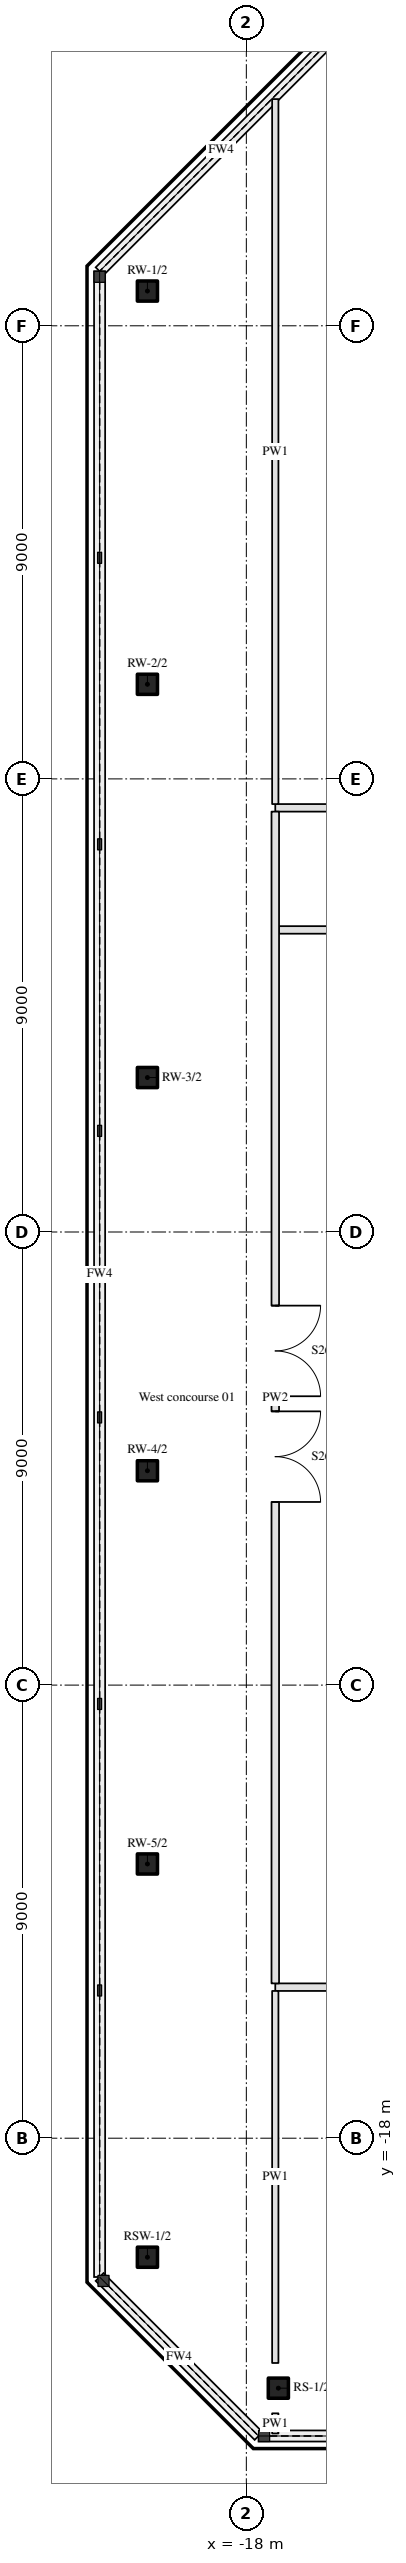
"""IFC4 building model, lengths in metres.
Left out: names, types, materials, properties, quantities, classifications, styles, units other than length and angle.
Written with IfcOpenShell. Run it as: python <this file> out.ifc"""

import sys

from ifc_helpers import new_model, si_unit, direction, frame, frame_2d, origin, origin_2d, place, context, subcontext, project, spatial, rectangle, hollow_rectangle, extrude, element, fill, save


model = new_model("IFC4")
c1 = context("Model", 3, precision=1e-05, world=origin(), true_north=direction((0.0, 1.0)))
c2 = subcontext(c1, "Body", "Model", "MODEL_VIEW")
j1 = project(units=[si_unit("LENGTHUNIT", "METRE"), si_unit("PLANEANGLEUNIT", "RADIAN")], contexts=[c1])
p1 = place(None, origin())
s1 = spatial("IfcSite", under=j1, at=p1, CompositionType="ELEMENT")
p2 = place(p1, origin())
s2 = spatial("IfcBuilding", under=s1, at=p2, CompositionType="ELEMENT")
p3 = place(p2, frame((0.0, 0.0, 108.9)))
s3 = spatial("IfcBuildingStorey", under=s2, at=p3, CompositionType="ELEMENT", Elevation=108.9)
for number, where, z_axis, x_axis in (
    (1, (-17.364, -22.965, 0.0), (0.0, 0.0, 1.0), (1.0, 0.0, 0.0)),
    (2, (-19.965, 18.69, 0.0), (0.0, 0.0, 1.0), (1.0, 0.0, 0.0)),
    (3, (-19.965, 10.879, 0.0), (0.0, 0.0, 1.0), (1.0, 0.0, 0.0)),
    (4, (-19.965, 3.068, 0.0), (0.0, 0.0, 1.0), (1.0, 0.0, 0.0)),
    (5, (-19.965, -4.742, 0.0), (0.0, 0.0, 1.0), (1.0, 0.0, 0.0)),
    (6, (-19.965, -12.553, 0.0), (0.0, 0.0, 1.0), (1.0, 0.0, 0.0)),
    (7, (-19.965, -20.364, 0.0), (0.0, 0.0, 1.0), (1.0, 0.0, 0.0)),
):
    element("IfcColumn", number, at=place(p3, frame(where, z_axis=z_axis, x_axis=x_axis)), inside=s3, PredefinedType="COLUMN", context=c2, shape_type="SweptSolid", body=[
        extrude(hollow_rectangle(XDim=0.4, YDim=0.4, WallThickness=0.025, InnerFilletRadius=0.038, OuterFilletRadius=0.062, at=origin_2d()), origin(), (0.0, 0.0, 1.0), 5.4),
    ])
p4 = place(p3, frame((-17.425, -15.0, 0.0), z_axis=(0.0, 0.0, 1.0), x_axis=(1.0, 0.0, 0.0)))
e8 = element("IfcWall", 8, at=p4, inside=s3, PredefinedType="PARTITIONING", context=c2, shape_type="SweptSolid", body=[
    extrude(rectangle(XDim=34.85, YDim=0.15, at=frame_2d((17.425, 0.0))), origin(), (0.0, 0.0, 1.0), 4.46),
])
p5 = place(p4, frame((16.525, 0.0, 0.0)))
e9 = element("IfcOpeningElement", 9, at=p5, cuts=e8, PredefinedType="OPENING", context=c2, shape_type="SweptSolid", body=[
    extrude(rectangle(XDim=1.8, YDim=2.1, at=frame_2d((0.9, 1.05))), frame((0.0, 0.085, 0.0), z_axis=(0.0, -1.0, 0.0), x_axis=(1.0, 0.0, 0.0)), (0.0, 0.0, 1.0), 0.17),
])
p6 = place(p4, frame((18.625, 0.0, 0.0)))
e10 = element("IfcOpeningElement", 10, at=p6, cuts=e8, PredefinedType="OPENING", context=c2, shape_type="SweptSolid", body=[
    extrude(rectangle(XDim=1.8, YDim=2.1, at=frame_2d((0.9, 1.05))), frame((0.0, 0.085, 0.0), z_axis=(0.0, -1.0, 0.0), x_axis=(1.0, 0.0, 0.0)), (0.0, 0.0, 1.0), 0.17),
])
p7 = place(p3, frame((-17.35, 6.0, 0.0), z_axis=(0.0, 0.0, 1.0), x_axis=(1.0, 0.0, 0.0)))
e11 = element("IfcWall", 11, at=p7, inside=s3, PredefinedType="PARTITIONING", context=c2, shape_type="SweptSolid", body=[
    extrude(rectangle(XDim=10.0, YDim=0.15, at=frame_2d((5.0, 0.0))), origin(), (0.0, 0.0, 1.0), 4.46),
])
p8 = place(p7, frame((2.056, 0.0, 0.0)))
e12 = element("IfcOpeningElement", 12, at=p8, cuts=e11, PredefinedType="OPENING", context=c2, shape_type="SweptSolid", body=[
    extrude(rectangle(XDim=0.9, YDim=2.1, at=frame_2d((0.45, 1.05))), frame((0.0, 0.085, 0.0), z_axis=(0.0, -1.0, 0.0), x_axis=(1.0, 0.0, 0.0)), (0.0, 0.0, 1.0), 0.17),
])
p9 = place(p7, frame((7.056, 0.0, 0.0)))
e13 = element("IfcOpeningElement", 13, at=p9, cuts=e11, PredefinedType="OPENING", context=c2, shape_type="SweptSolid", body=[
    extrude(rectangle(XDim=0.9, YDim=2.1, at=frame_2d((0.45, 1.05))), frame((0.0, 0.085, 0.0), z_axis=(0.0, -1.0, 0.0), x_axis=(1.0, 0.0, 0.0)), (0.0, 0.0, 1.0), 0.17),
])
p10 = place(p3, frame((-17.425, 8.425, 0.0), z_axis=(0.0, 0.0, 1.0), x_axis=(1.0, 0.0, 0.0)))
e14 = element("IfcWall", 14, at=p10, inside=s3, PredefinedType="PARTITIONING", context=c2, shape_type="SweptSolid", body=[
    extrude(rectangle(XDim=10.175, YDim=0.15, at=frame_2d((5.087, 0.0))), origin(), (0.0, 0.0, 1.0), 4.46),
])
p11 = place(p3, frame((-17.425, -23.865, 0.0), z_axis=(0.0, 0.0, 1.0), x_axis=(0.0, 1.0, 0.0)))
e15 = element("IfcWall", 15, at=p11, inside=s3, PredefinedType="PARTITIONING", context=c2, shape_type="SweptSolid", body=[
    extrude(rectangle(XDim=0.4, YDim=0.125, at=frame_2d((0.2, 0.0))), origin(), (0.0, 0.0, 1.0), 4.46),
])
p12 = place(p3, frame((-17.425, -22.465, 0.0), z_axis=(0.0, 0.0, 1.0), x_axis=(0.0, 1.0, 0.0)))
e16 = element("IfcWall", 16, at=p12, inside=s3, PredefinedType="PARTITIONING", context=c2, shape_type="SweptSolid", body=[
    extrude(rectangle(XDim=7.39, YDim=0.125, at=frame_2d((3.695, 0.0))), origin(), (0.0, 0.0, 1.0), 4.46),
])
p13 = place(p3, frame((-17.425, 8.35, 0.0), z_axis=(0.0, 0.0, 1.0), x_axis=(0.0, -1.0, 0.0)))
e17 = element("IfcWall", 17, at=p13, inside=s3, PredefinedType="PARTITIONING", context=c2, shape_type="SweptSolid", body=[
    extrude(rectangle(XDim=23.275, YDim=0.15, at=frame_2d((11.638, 0.0))), origin(), (0.0, 0.0, 1.0), 4.46),
])
p14 = place(p13, frame((11.913, 0.0, 0.0)))
e18 = element("IfcOpeningElement", 18, at=p14, cuts=e17, PredefinedType="OPENING", context=c2, shape_type="SweptSolid", body=[
    extrude(rectangle(XDim=1.8, YDim=2.1, at=frame_2d((0.9, 1.05))), frame((0.0, 0.085, 0.0), z_axis=(0.0, -1.0, 0.0), x_axis=(1.0, 0.0, 0.0)), (0.0, 0.0, 1.0), 0.17),
])
p15 = place(p13, frame((9.812, 0.0, 0.0)))
e19 = element("IfcOpeningElement", 19, at=p15, cuts=e17, PredefinedType="OPENING", context=c2, shape_type="SweptSolid", body=[
    extrude(rectangle(XDim=1.8, YDim=2.1, at=frame_2d((0.9, 1.05))), frame((0.0, 0.085, 0.0), z_axis=(0.0, -1.0, 0.0), x_axis=(1.0, 0.0, 0.0)), (0.0, 0.0, 1.0), 0.17),
])
p16 = place(p3, frame((-17.425, 8.5, 0.0), z_axis=(0.0, 0.0, 1.0), x_axis=(0.0, 1.0, 0.0)))
e20 = element("IfcWall", 20, at=p16, inside=s3, PredefinedType="PARTITIONING", context=c2, shape_type="SweptSolid", body=[
    extrude(rectangle(XDim=14.003, YDim=0.125, at=frame_2d((7.001, 0.0))), origin(), (0.0, 0.0, 1.0), 4.46),
])
p17 = place(p14, origin())
e21 = element("IfcDoor", 21, at=p17, inside=s3, OperationType="DOUBLE_DOOR_SINGLE_SWING", PredefinedType="DOOR", context=c2, shape_type="SweptSolid", body=[
    extrude(rectangle(XDim=1.8, YDim=2.1, at=frame_2d((0.9, 1.05))), frame((0.0, 0.025, 0.0), z_axis=(0.0, -1.0, 0.0), x_axis=(1.0, 0.0, 0.0)), (0.0, 0.0, 1.0), 0.05),
])
fill(e18, e21)
p18 = place(p15, origin())
e22 = element("IfcDoor", 22, at=p18, inside=s3, OperationType="DOUBLE_DOOR_SINGLE_SWING", PredefinedType="DOOR", context=c2, shape_type="SweptSolid", body=[
    extrude(rectangle(XDim=1.8, YDim=2.1, at=frame_2d((0.9, 1.05))), frame((0.0, 0.025, 0.0), z_axis=(0.0, -1.0, 0.0), x_axis=(1.0, 0.0, 0.0)), (0.0, 0.0, 1.0), 0.05),
])
fill(e19, e22)
save(model, sys.argv[1])
